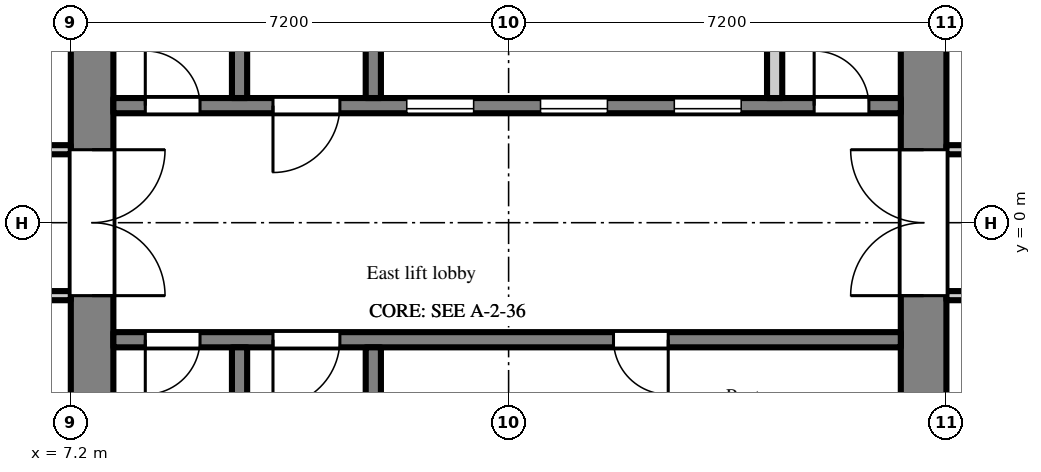
"""IFC4 building model, lengths in metres.
Left out: names, types, materials, properties, quantities, classifications, styles, units other than length and angle.
Written with IfcOpenShell. Run it as: python <this file> out.ifc"""

import sys

from ifc_helpers import new_model, si_unit, direction, frame, frame_2d, origin, place, context, subcontext, project, spatial, rectangle, extrude, element, fill, save


model = new_model("IFC4")
c1 = context("Model", 3, precision=1e-05, world=origin(), true_north=direction((0.0, 1.0)))
c2 = subcontext(c1, "Body", "Model", "MODEL_VIEW")
j1 = project(units=[si_unit("LENGTHUNIT", "METRE"), si_unit("PLANEANGLEUNIT", "RADIAN")], contexts=[c1])
p1 = place(None, origin())
s1 = spatial("IfcSite", under=j1, at=p1, CompositionType="ELEMENT")
p2 = place(p1, origin())
s2 = spatial("IfcBuilding", under=s1, at=p2, CompositionType="ELEMENT")
p3 = place(p2, frame((0.0, 0.0, 216.9)))
s3 = spatial("IfcBuildingStorey", under=s2, at=p3, CompositionType="ELEMENT", Elevation=216.9)
p4 = place(p3, frame((7.55, -7.2, 0.0), z_axis=(0.0, 0.0, 1.0), x_axis=(0.0, 1.0, 0.0)))
e1 = element("IfcWall", 1, at=p4, inside=s3, PredefinedType="SHEAR", context=c2, shape_type="SweptSolid", body=[
    extrude(rectangle(XDim=14.4, YDim=0.7, at=frame_2d((7.2, 0.0))), origin(), (0.0, 0.0, 1.0), 2.6),
])
p5 = place(p4, frame((6.0, 0.0, 0.0)))
e2 = element("IfcOpeningElement", 2, at=p5, cuts=e1, PredefinedType="OPENING", context=c2, shape_type="SweptSolid", body=[
    extrude(rectangle(XDim=2.4, YDim=2.2, at=frame_2d((1.2, 1.1))), frame((0.0, 0.36, 0.0), z_axis=(0.0, -1.0, 0.0), x_axis=(1.0, 0.0, 0.0)), (0.0, 0.0, 1.0), 0.72),
])
p6 = place(p3, frame((21.225, -7.2, 0.0), z_axis=(0.0, 0.0, 1.0), x_axis=(0.0, 1.0, 0.0)))
e3 = element("IfcWall", 3, at=p6, inside=s3, PredefinedType="SHEAR", context=c2, shape_type="SweptSolid", body=[
    extrude(rectangle(XDim=14.4, YDim=0.75, at=frame_2d((7.2, 0.0))), origin(), (0.0, 0.0, 1.0), 2.6),
])
p7 = place(p6, frame((6.0, 0.0, 0.0)))
e4 = element("IfcOpeningElement", 4, at=p7, cuts=e3, PredefinedType="OPENING", context=c2, shape_type="SweptSolid", body=[
    extrude(rectangle(XDim=2.4, YDim=2.2, at=frame_2d((1.2, 1.1))), frame((0.0, 0.385, 0.0), z_axis=(0.0, -1.0, 0.0), x_axis=(1.0, 0.0, 0.0)), (0.0, 0.0, 1.0), 0.77),
])
p8 = place(p3, frame((7.9, 1.925, 0.0), z_axis=(0.0, 0.0, 1.0), x_axis=(1.0, 0.0, 0.0)))
e5 = element("IfcWall", 5, at=p8, inside=s3, PredefinedType="SHEAR", context=c2, shape_type="SweptSolid", body=[
    extrude(rectangle(XDim=12.95, YDim=0.25, at=frame_2d((6.475, 0.0))), origin(), (0.0, 0.0, 1.0), 2.6),
])
p9 = place(p8, frame((4.825, 0.0, 0.0)))
e6 = element("IfcOpeningElement", 6, at=p9, cuts=e5, PredefinedType="OPENING", context=c2, shape_type="SweptSolid", body=[
    extrude(rectangle(XDim=1.1, YDim=2.1, at=frame_2d((0.55, 1.05))), frame((0.0, 0.135, 0.0), z_axis=(0.0, -1.0, 0.0), x_axis=(1.0, 0.0, 0.0)), (0.0, 0.0, 1.0), 0.27),
])
p10 = place(p8, frame((7.025, 0.0, 0.0)))
e7 = element("IfcOpeningElement", 7, at=p10, cuts=e5, PredefinedType="OPENING", context=c2, shape_type="SweptSolid", body=[
    extrude(rectangle(XDim=1.1, YDim=2.1, at=frame_2d((0.55, 1.05))), frame((0.0, 0.135, 0.0), z_axis=(0.0, -1.0, 0.0), x_axis=(1.0, 0.0, 0.0)), (0.0, 0.0, 1.0), 0.27),
])
p11 = place(p8, frame((9.225, 0.0, 0.0)))
e8 = element("IfcOpeningElement", 8, at=p11, cuts=e5, PredefinedType="OPENING", context=c2, shape_type="SweptSolid", body=[
    extrude(rectangle(XDim=1.1, YDim=2.1, at=frame_2d((0.55, 1.05))), frame((0.0, 0.135, 0.0), z_axis=(0.0, -1.0, 0.0), x_axis=(1.0, 0.0, 0.0)), (0.0, 0.0, 1.0), 0.27),
])
p12 = place(p8, frame((0.525, 0.0, 0.0)))
e9 = element("IfcOpeningElement", 9, at=p12, cuts=e5, PredefinedType="OPENING", context=c2, shape_type="SweptSolid", body=[
    extrude(rectangle(XDim=0.9, YDim=2.1, at=frame_2d((0.45, 1.05))), frame((0.0, 0.135, 0.0), z_axis=(0.0, -1.0, 0.0), x_axis=(1.0, 0.0, 0.0)), (0.0, 0.0, 1.0), 0.27),
])
p13 = place(p8, frame((2.625, 0.0, 0.0)))
e10 = element("IfcOpeningElement", 10, at=p13, cuts=e5, PredefinedType="OPENING", context=c2, shape_type="SweptSolid", body=[
    extrude(rectangle(XDim=1.1, YDim=2.1, at=frame_2d((0.55, 1.05))), frame((0.0, 0.135, 0.0), z_axis=(0.0, -1.0, 0.0), x_axis=(1.0, 0.0, 0.0)), (0.0, 0.0, 1.0), 0.27),
])
p14 = place(p8, frame((11.525, 0.0, 0.0)))
e11 = element("IfcOpeningElement", 11, at=p14, cuts=e5, PredefinedType="OPENING", context=c2, shape_type="SweptSolid", body=[
    extrude(rectangle(XDim=0.9, YDim=2.1, at=frame_2d((0.45, 1.05))), frame((0.0, 0.135, 0.0), z_axis=(0.0, -1.0, 0.0), x_axis=(1.0, 0.0, 0.0)), (0.0, 0.0, 1.0), 0.27),
])
p15 = place(p3, frame((9.975, 2.05, 0.0), z_axis=(0.0, 0.0, 1.0), x_axis=(0.0, 1.0, 0.0)))
e12 = element("IfcWall", 12, at=p15, inside=s3, PredefinedType="SHEAR", context=c2, shape_type="SweptSolid", body=[
    extrude(rectangle(XDim=4.75, YDim=0.25, at=frame_2d((2.375, 0.0))), origin(), (0.0, 0.0, 1.0), 2.6),
])
p16 = place(p15, frame((2.95, 0.0, 0.0)))
e13 = element("IfcOpeningElement", 13, at=p16, cuts=e12, PredefinedType="OPENING", context=c2, shape_type="SweptSolid", body=[
    extrude(rectangle(XDim=1.1, YDim=2.1, at=frame_2d((0.55, 1.05))), frame((0.0, 0.135, 0.0), z_axis=(0.0, -1.0, 0.0), x_axis=(1.0, 0.0, 0.0)), (0.0, 0.0, 1.0), 0.27),
])
p17 = place(p3, frame((12.175, 2.05, 0.0), z_axis=(0.0, 0.0, 1.0), x_axis=(0.0, 1.0, 0.0)))
e14 = element("IfcWall", 14, at=p17, inside=s3, PredefinedType="SHEAR", context=c2, shape_type="SweptSolid", body=[
    extrude(rectangle(XDim=4.75, YDim=0.25, at=frame_2d((2.375, 0.0))), origin(), (0.0, 0.0, 1.0), 2.6),
])
p18 = place(p17, frame((3.0, 0.0, 0.0)))
e15 = element("IfcOpeningElement", 15, at=p18, cuts=e14, PredefinedType="OPENING", context=c2, shape_type="SweptSolid", body=[
    extrude(rectangle(XDim=1.1, YDim=2.1, at=frame_2d((0.55, 1.05))), frame((0.0, 0.135, 0.0), z_axis=(0.0, -1.0, 0.0), x_axis=(1.0, 0.0, 0.0)), (0.0, 0.0, 1.0), 0.27),
])
p19 = place(p3, frame((18.775, 2.05, 0.0), z_axis=(0.0, 0.0, 1.0), x_axis=(0.0, 1.0, 0.0)))
e16 = element("IfcWall", 16, at=p19, inside=s3, PredefinedType="PARTITIONING", context=c2, shape_type="SweptSolid", body=[
    extrude(rectangle(XDim=2.1, YDim=0.25, at=frame_2d((1.05, 0.0))), origin(), (0.0, 0.0, 1.0), 2.6),
])
p20 = place(p3, frame((7.9, -1.925, 0.0), z_axis=(0.0, 0.0, 1.0), x_axis=(1.0, 0.0, 0.0)))
e17 = element("IfcWall", 17, at=p20, inside=s3, PredefinedType="SHEAR", context=c2, shape_type="SweptSolid", body=[
    extrude(rectangle(XDim=12.95, YDim=0.25, at=frame_2d((6.475, 0.0))), origin(), (0.0, 0.0, 1.0), 2.6),
])
p21 = place(p20, frame((0.525, 0.0, 0.0)))
e18 = element("IfcOpeningElement", 18, at=p21, cuts=e17, PredefinedType="OPENING", context=c2, shape_type="SweptSolid", body=[
    extrude(rectangle(XDim=0.9, YDim=2.1, at=frame_2d((0.45, 1.05))), frame((0.0, 0.135, 0.0), z_axis=(0.0, -1.0, 0.0), x_axis=(1.0, 0.0, 0.0)), (0.0, 0.0, 1.0), 0.27),
])
p22 = place(p20, frame((2.625, 0.0, 0.0)))
e19 = element("IfcOpeningElement", 19, at=p22, cuts=e17, PredefinedType="OPENING", context=c2, shape_type="SweptSolid", body=[
    extrude(rectangle(XDim=1.1, YDim=2.1, at=frame_2d((0.55, 1.05))), frame((0.0, 0.135, 0.0), z_axis=(0.0, -1.0, 0.0), x_axis=(1.0, 0.0, 0.0)), (0.0, 0.0, 1.0), 0.27),
])
p23 = place(p20, frame((8.225, 0.0, 0.0)))
e20 = element("IfcOpeningElement", 20, at=p23, cuts=e17, PredefinedType="OPENING", context=c2, shape_type="SweptSolid", body=[
    extrude(rectangle(XDim=0.9, YDim=2.1, at=frame_2d((0.45, 1.05))), frame((0.0, 0.135, 0.0), z_axis=(0.0, -1.0, 0.0), x_axis=(1.0, 0.0, 0.0)), (0.0, 0.0, 1.0), 0.27),
])
p24 = place(p3, frame((9.975, -2.05, 0.0), z_axis=(0.0, 0.0, 1.0), x_axis=(0.0, -1.0, 0.0)))
e21 = element("IfcWall", 21, at=p24, inside=s3, PredefinedType="SHEAR", context=c2, shape_type="SweptSolid", body=[
    extrude(rectangle(XDim=4.75, YDim=0.25, at=frame_2d((2.375, 0.0))), origin(), (0.0, 0.0, 1.0), 2.6),
])
p25 = place(p24, frame((2.95, 0.0, 0.0)))
e22 = element("IfcOpeningElement", 22, at=p25, cuts=e21, PredefinedType="OPENING", context=c2, shape_type="SweptSolid", body=[
    extrude(rectangle(XDim=1.1, YDim=2.1, at=frame_2d((0.55, 1.05))), frame((0.0, 0.135, 0.0), z_axis=(0.0, -1.0, 0.0), x_axis=(1.0, 0.0, 0.0)), (0.0, 0.0, 1.0), 0.27),
])
p26 = place(p3, frame((12.175, -2.05, 0.0), z_axis=(0.0, 0.0, 1.0), x_axis=(0.0, -1.0, 0.0)))
e23 = element("IfcWall", 23, at=p26, inside=s3, PredefinedType="SHEAR", context=c2, shape_type="SweptSolid", body=[
    extrude(rectangle(XDim=4.75, YDim=0.25, at=frame_2d((2.375, 0.0))), origin(), (0.0, 0.0, 1.0), 2.6),
])
p27 = place(p26, frame((3.0, 0.0, 0.0)))
e24 = element("IfcOpeningElement", 24, at=p27, cuts=e23, PredefinedType="OPENING", context=c2, shape_type="SweptSolid", body=[
    extrude(rectangle(XDim=1.1, YDim=2.1, at=frame_2d((0.55, 1.05))), frame((0.0, 0.135, 0.0), z_axis=(0.0, -1.0, 0.0), x_axis=(1.0, 0.0, 0.0)), (0.0, 0.0, 1.0), 0.27),
])
p28 = place(p3, frame((1.275, -1.2, 0.0), z_axis=(0.0, 0.0, 1.0), x_axis=(1.0, 0.0, 0.0)))
e25 = element("IfcWall", 25, at=p28, inside=s3, PredefinedType="PARTITIONING", context=c2, shape_type="SweptSolid", body=[
    extrude(rectangle(XDim=5.925, YDim=0.15, at=frame_2d((2.962, 0.0))), origin(), (0.0, 0.0, 1.0), 2.6),
])
p29 = place(p3, frame((1.275, 1.2, 0.0), z_axis=(0.0, 0.0, 1.0), x_axis=(1.0, 0.0, 0.0)))
e26 = element("IfcWall", 26, at=p29, inside=s3, PredefinedType="PARTITIONING", context=c2, shape_type="SweptSolid", body=[
    extrude(rectangle(XDim=5.925, YDim=0.15, at=frame_2d((2.962, 0.0))), origin(), (0.0, 0.0, 1.0), 2.6),
])
p30 = place(p29, frame((0.675, 0.0, 0.0)))
e27 = element("IfcOpeningElement", 27, at=p30, cuts=e26, PredefinedType="OPENING", context=c2, shape_type="SweptSolid", body=[
    extrude(rectangle(XDim=0.9, YDim=2.1, at=frame_2d((0.45, 1.05))), frame((0.0, 0.085, 0.0), z_axis=(0.0, -1.0, 0.0), x_axis=(1.0, 0.0, 0.0)), (0.0, 0.0, 1.0), 0.17),
])
p31 = place(p29, frame((3.075, 0.0, 0.0)))
e28 = element("IfcOpeningElement", 28, at=p31, cuts=e26, PredefinedType="OPENING", context=c2, shape_type="SweptSolid", body=[
    extrude(rectangle(XDim=0.9, YDim=2.1, at=frame_2d((0.45, 1.05))), frame((0.0, 0.085, 0.0), z_axis=(0.0, -1.0, 0.0), x_axis=(1.0, 0.0, 0.0)), (0.0, 0.0, 1.0), 0.17),
])
p32 = place(p3, frame((21.6, -1.2, 0.0), z_axis=(0.0, 0.0, 1.0), x_axis=(1.0, 0.0, 0.0)))
e29 = element("IfcWall", 29, at=p32, inside=s3, PredefinedType="PARTITIONING", context=c2, shape_type="SweptSolid", body=[
    extrude(rectangle(XDim=5.125, YDim=0.15, at=frame_2d((2.562, 0.0))), origin(), (0.0, 0.0, 1.0), 2.6),
])
p33 = place(p32, frame((1.35, 0.0, 0.0)))
e30 = element("IfcOpeningElement", 30, at=p33, cuts=e29, PredefinedType="OPENING", context=c2, shape_type="SweptSolid", body=[
    extrude(rectangle(XDim=0.9, YDim=2.1, at=frame_2d((0.45, 1.05))), frame((0.0, 0.085, 0.0), z_axis=(0.0, -1.0, 0.0), x_axis=(1.0, 0.0, 0.0)), (0.0, 0.0, 1.0), 0.17),
])
p34 = place(p32, frame((3.95, 0.0, 0.0)))
e31 = element("IfcOpeningElement", 31, at=p34, cuts=e29, PredefinedType="OPENING", context=c2, shape_type="SweptSolid", body=[
    extrude(rectangle(XDim=0.9, YDim=2.1, at=frame_2d((0.45, 1.05))), frame((0.0, 0.085, 0.0), z_axis=(0.0, -1.0, 0.0), x_axis=(1.0, 0.0, 0.0)), (0.0, 0.0, 1.0), 0.17),
])
p35 = place(p3, frame((21.6, 1.2, 0.0), z_axis=(0.0, 0.0, 1.0), x_axis=(1.0, 0.0, 0.0)))
e32 = element("IfcWall", 32, at=p35, inside=s3, PredefinedType="PARTITIONING", context=c2, shape_type="SweptSolid", body=[
    extrude(rectangle(XDim=5.125, YDim=0.15, at=frame_2d((2.562, 0.0))), origin(), (0.0, 0.0, 1.0), 2.6),
])
p36 = place(p35, frame((0.45, 0.0, 0.0)))
e33 = element("IfcOpeningElement", 33, at=p36, cuts=e32, PredefinedType="OPENING", context=c2, shape_type="SweptSolid", body=[
    extrude(rectangle(XDim=0.9, YDim=2.1, at=frame_2d((0.45, 1.05))), frame((0.0, 0.085, 0.0), z_axis=(0.0, -1.0, 0.0), x_axis=(1.0, 0.0, 0.0)), (0.0, 0.0, 1.0), 0.17),
])
p37 = place(p35, frame((2.25, 0.0, 0.0)))
e34 = element("IfcOpeningElement", 34, at=p37, cuts=e32, PredefinedType="OPENING", context=c2, shape_type="SweptSolid", body=[
    extrude(rectangle(XDim=0.9, YDim=2.1, at=frame_2d((0.45, 1.05))), frame((0.0, 0.085, 0.0), z_axis=(0.0, -1.0, 0.0), x_axis=(1.0, 0.0, 0.0)), (0.0, 0.0, 1.0), 0.17),
])
p38 = place(p35, frame((3.95, 0.0, 0.0)))
e35 = element("IfcOpeningElement", 35, at=p38, cuts=e32, PredefinedType="OPENING", context=c2, shape_type="SweptSolid", body=[
    extrude(rectangle(XDim=0.9, YDim=2.1, at=frame_2d((0.45, 1.05))), frame((0.0, 0.085, 0.0), z_axis=(0.0, -1.0, 0.0), x_axis=(1.0, 0.0, 0.0)), (0.0, 0.0, 1.0), 0.17),
])
p39 = place(p9, origin())
e36 = element("IfcDoor", 36, at=p39, inside=s3, OperationType="SLIDING_TO_LEFT", PredefinedType="DOOR", context=c2, shape_type="SweptSolid", body=[
    extrude(rectangle(XDim=1.1, YDim=2.1, at=frame_2d((0.55, 1.05))), frame((0.0, 0.025, 0.0), z_axis=(0.0, -1.0, 0.0), x_axis=(1.0, 0.0, 0.0)), (0.0, 0.0, 1.0), 0.05),
])
fill(e6, e36)
p40 = place(p10, origin())
e37 = element("IfcDoor", 37, at=p40, inside=s3, OperationType="SLIDING_TO_LEFT", PredefinedType="DOOR", context=c2, shape_type="SweptSolid", body=[
    extrude(rectangle(XDim=1.1, YDim=2.1, at=frame_2d((0.55, 1.05))), frame((0.0, 0.025, 0.0), z_axis=(0.0, -1.0, 0.0), x_axis=(1.0, 0.0, 0.0)), (0.0, 0.0, 1.0), 0.05),
])
fill(e7, e37)
p41 = place(p11, origin())
e38 = element("IfcDoor", 38, at=p41, inside=s3, OperationType="SLIDING_TO_LEFT", PredefinedType="DOOR", context=c2, shape_type="SweptSolid", body=[
    extrude(rectangle(XDim=1.1, YDim=2.1, at=frame_2d((0.55, 1.05))), frame((0.0, 0.025, 0.0), z_axis=(0.0, -1.0, 0.0), x_axis=(1.0, 0.0, 0.0)), (0.0, 0.0, 1.0), 0.05),
])
fill(e8, e38)
p42 = place(p12, origin())
e39 = element("IfcDoor", 39, at=p42, inside=s3, OperationType="SINGLE_SWING_LEFT", PredefinedType="DOOR", context=c2, shape_type="SweptSolid", body=[
    extrude(rectangle(XDim=0.9, YDim=2.1, at=frame_2d((0.45, 1.05))), frame((0.0, 0.025, 0.0), z_axis=(0.0, -1.0, 0.0), x_axis=(1.0, 0.0, 0.0)), (0.0, 0.0, 1.0), 0.05),
])
fill(e9, e39)
p43 = place(p21, frame((0.9, 0.0, 0.0), z_axis=(0.0, 0.0, 1.0), x_axis=(-1.0, 0.0, 0.0)))
e40 = element("IfcDoor", 40, at=p43, inside=s3, OperationType="SINGLE_SWING_RIGHT", PredefinedType="DOOR", context=c2, shape_type="SweptSolid", body=[
    extrude(rectangle(XDim=0.9, YDim=2.1, at=frame_2d((0.45, 1.05))), frame((0.0, 0.025, 0.0), z_axis=(0.0, -1.0, 0.0), x_axis=(1.0, 0.0, 0.0)), (0.0, 0.0, 1.0), 0.05),
])
fill(e18, e40)
p44 = place(p13, frame((1.1, 0.0, 0.0), z_axis=(0.0, 0.0, 1.0), x_axis=(-1.0, 0.0, 0.0)))
e41 = element("IfcDoor", 41, at=p44, inside=s3, OperationType="SINGLE_SWING_RIGHT", PredefinedType="DOOR", context=c2, shape_type="SweptSolid", body=[
    extrude(rectangle(XDim=1.1, YDim=2.1, at=frame_2d((0.55, 1.05))), frame((0.0, 0.025, 0.0), z_axis=(0.0, -1.0, 0.0), x_axis=(1.0, 0.0, 0.0)), (0.0, 0.0, 1.0), 0.05),
])
fill(e10, e41)
p45 = place(p22, frame((1.1, 0.0, 0.0), z_axis=(0.0, 0.0, 1.0), x_axis=(-1.0, 0.0, 0.0)))
e42 = element("IfcDoor", 42, at=p45, inside=s3, OperationType="SINGLE_SWING_RIGHT", PredefinedType="DOOR", context=c2, shape_type="SweptSolid", body=[
    extrude(rectangle(XDim=1.1, YDim=2.1, at=frame_2d((0.55, 1.05))), frame((0.0, 0.025, 0.0), z_axis=(0.0, -1.0, 0.0), x_axis=(1.0, 0.0, 0.0)), (0.0, 0.0, 1.0), 0.05),
])
fill(e19, e42)
p46 = place(p5, frame((2.4, 0.0, 0.0), z_axis=(0.0, 0.0, 1.0), x_axis=(-1.0, 0.0, 0.0)))
e43 = element("IfcDoor", 43, at=p46, inside=s3, OperationType="DOUBLE_DOOR_DOUBLE_SWING", PredefinedType="DOOR", context=c2, shape_type="SweptSolid", body=[
    extrude(rectangle(XDim=2.4, YDim=2.2, at=frame_2d((1.2, 1.1))), frame((0.0, 0.025, 0.0), z_axis=(0.0, -1.0, 0.0), x_axis=(1.0, 0.0, 0.0)), (0.0, 0.0, 1.0), 0.05),
])
fill(e2, e43)
p47 = place(p7, origin())
e44 = element("IfcDoor", 44, at=p47, inside=s3, OperationType="DOUBLE_DOOR_DOUBLE_SWING", PredefinedType="DOOR", context=c2, shape_type="SweptSolid", body=[
    extrude(rectangle(XDim=2.4, YDim=2.2, at=frame_2d((1.2, 1.1))), frame((0.0, 0.025, 0.0), z_axis=(0.0, -1.0, 0.0), x_axis=(1.0, 0.0, 0.0)), (0.0, 0.0, 1.0), 0.05),
])
fill(e4, e44)
p48 = place(p14, origin())
e45 = element("IfcDoor", 45, at=p48, inside=s3, OperationType="SINGLE_SWING_LEFT", PredefinedType="DOOR", context=c2, shape_type="SweptSolid", body=[
    extrude(rectangle(XDim=0.9, YDim=2.1, at=frame_2d((0.45, 1.05))), frame((0.0, 0.025, 0.0), z_axis=(0.0, -1.0, 0.0), x_axis=(1.0, 0.0, 0.0)), (0.0, 0.0, 1.0), 0.05),
])
fill(e11, e45)
p49 = place(p23, frame((0.9, 0.0, 0.0), z_axis=(0.0, 0.0, 1.0), x_axis=(-1.0, 0.0, 0.0)))
e46 = element("IfcDoor", 46, at=p49, inside=s3, OperationType="SINGLE_SWING_LEFT", PredefinedType="DOOR", context=c2, shape_type="SweptSolid", body=[
    extrude(rectangle(XDim=0.9, YDim=2.1, at=frame_2d((0.45, 1.05))), frame((0.0, 0.025, 0.0), z_axis=(0.0, -1.0, 0.0), x_axis=(1.0, 0.0, 0.0)), (0.0, 0.0, 1.0), 0.05),
])
fill(e20, e46)
save(model, sys.argv[1])
